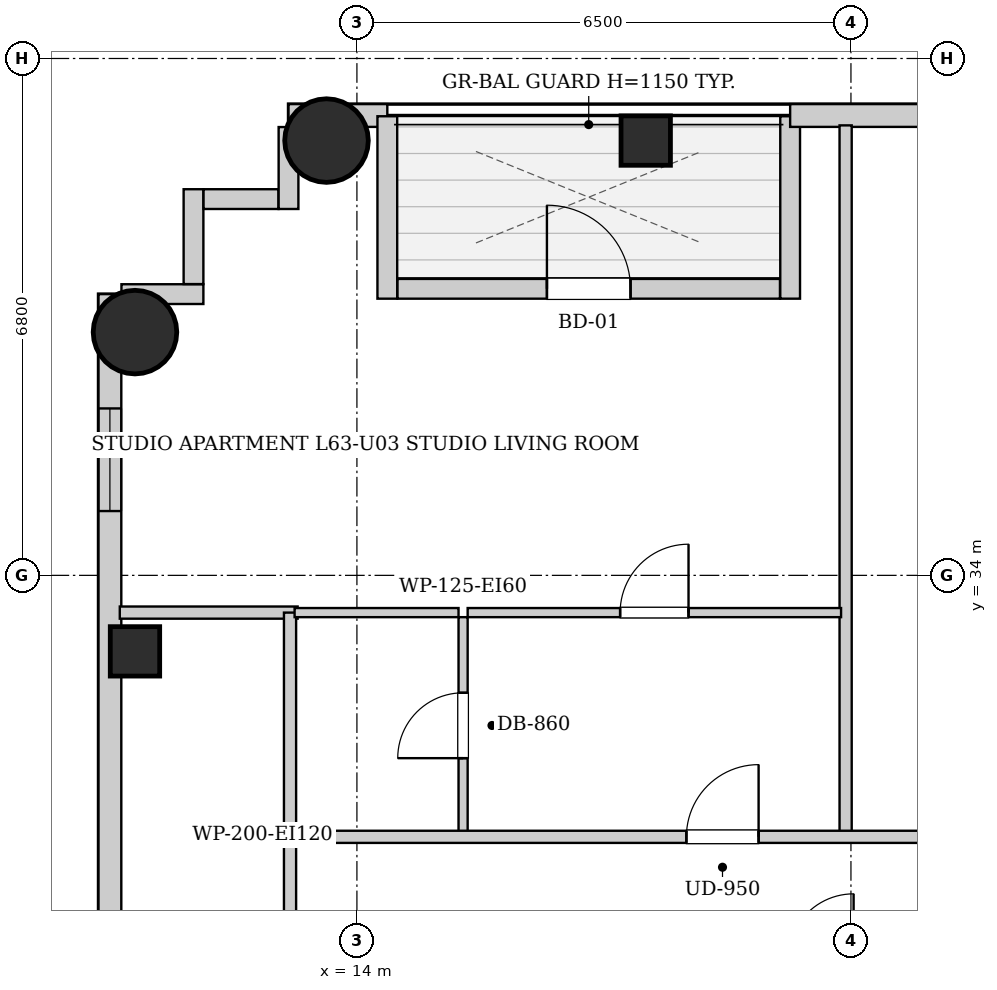
"""IFC4 building model, lengths in metres.
Left out: names, types, materials, properties, quantities, classifications, styles, units other than length and angle.
Written with IfcOpenShell. Run it as: python <this file> out.ifc"""

import sys

from ifc_helpers import new_model, si_unit, direction, frame, frame_2d, origin, origin_2d, place, context, subcontext, project, spatial, rectangle, circle, extrude, element, fill, save


model = new_model("IFC4")
c1 = context("Model", 3, precision=1e-05, world=origin(), true_north=direction((0.0, 1.0)))
c2 = subcontext(c1, "Body", "Model", "MODEL_VIEW")
j1 = project(units=[si_unit("LENGTHUNIT", "METRE"), si_unit("PLANEANGLEUNIT", "RADIAN")], contexts=[c1])
p1 = place(None, origin())
s1 = spatial("IfcSite", under=j1, at=p1, CompositionType="ELEMENT")
p2 = place(p1, origin())
s2 = spatial("IfcBuilding", under=s1, at=p2, CompositionType="ELEMENT")
p3 = place(p2, frame((0.0, 0.0, 217.3)))
s3 = spatial("IfcBuildingStorey", under=s2, at=p3, CompositionType="ELEMENT", Elevation=217.3)
p4 = place(p3, frame((13.6, 39.72, 0.0), z_axis=(0.0, 0.0, 1.0), x_axis=(1.0, 0.0, 0.0)))
e1 = element("IfcColumn", 1, at=p4, inside=s3, PredefinedType="COLUMN", context=c2, shape_type="SweptSolid", body=[
    extrude(circle(Radius=0.55, at=origin_2d()), origin(), (0.0, 0.0, 1.0), 3.4),
])
for number, where, z_axis, x_axis in (
    (2, (17.8, 39.72, 0.0), (0.0, 0.0, 1.0), (1.0, 0.0, 0.0)),
    (3, (11.08, 33.0, 0.0), (0.0, 0.0, 1.0), (1.0, 0.0, 0.0)),
):
    element("IfcColumn", number, at=place(p3, frame(where, z_axis=z_axis, x_axis=x_axis)), inside=s3, PredefinedType="COLUMN", context=c2, shape_type="SweptSolid", body=[
        extrude(rectangle(XDim=0.65, YDim=0.65, at=origin_2d()), origin(), (0.0, 0.0, 1.0), 3.4),
    ])
p5 = place(p3, frame((11.08, 37.2, 0.0), z_axis=(0.0, 0.0, 1.0), x_axis=(1.0, 0.0, 0.0)))
e4 = element("IfcColumn", 4, at=p5, inside=s3, PredefinedType="COLUMN", context=c2, shape_type="SweptSolid", body=[
    extrude(circle(Radius=0.55, at=origin_2d()), origin(), (0.0, 0.0, 1.0), 3.4),
])
p6 = place(p3, frame((13.1, 40.05, 0.0), z_axis=(0.0, 0.0, 1.0), x_axis=(1.0, 0.0, 0.0)))
e5 = element("IfcWall", 5, at=p6, inside=s3, PredefinedType="SOLIDWALL", context=c2, shape_type="SweptSolid", body=[
    extrude(rectangle(XDim=1.3, YDim=0.3, at=frame_2d((0.65, 0.0))), origin(), (0.0, 0.0, 1.0), 3.14),
])
p7 = place(p3, frame((14.4, 40.04, 0.0), z_axis=(0.0, 0.0, 1.0), x_axis=(0.0, -1.0, 0.0)))
e6 = element("IfcWall", 6, at=p7, inside=s3, PredefinedType="SOLIDWALL", context=c2, shape_type="SweptSolid", body=[
    extrude(rectangle(XDim=2.4, YDim=0.26, at=frame_2d((1.2, 0.0))), origin(), (0.0, 0.0, 1.0), 3.14),
])
p8 = place(p3, frame((14.534, 37.77, 0.0), z_axis=(0.0, 0.0, 1.0), x_axis=(1.0, 0.0, 0.0)))
e7 = element("IfcWall", 7, at=p8, inside=s3, PredefinedType="SOLIDWALL", context=c2, shape_type="SweptSolid", body=[
    extrude(rectangle(XDim=5.032, YDim=0.26, at=frame_2d((2.516, 0.0))), origin(), (0.0, 0.0, 1.0), 3.14),
])
p9 = place(p8, frame((1.966, 0.0, 0.0)))
e8 = element("IfcOpeningElement", 8, at=p9, cuts=e7, PredefinedType="OPENING", context=c2, shape_type="SweptSolid", body=[
    extrude(rectangle(XDim=1.1, YDim=2.0, at=frame_2d((0.55, 1.0))), frame((0.0, 0.14, 0.0), z_axis=(0.0, -1.0, 0.0), x_axis=(1.0, 0.0, 0.0)), (0.0, 0.0, 1.0), 0.28),
])
p10 = place(p3, frame((19.7, 37.64, 0.0), z_axis=(0.0, 0.0, 1.0), x_axis=(0.0, 1.0, 0.0)))
e9 = element("IfcWall", 9, at=p10, inside=s3, PredefinedType="SOLIDWALL", context=c2, shape_type="SweptSolid", body=[
    extrude(rectangle(XDim=2.4, YDim=0.26, at=frame_2d((1.2, 0.0))), origin(), (0.0, 0.0, 1.0), 3.14),
])
p11 = place(p3, frame((19.7, 40.05, 0.0), z_axis=(0.0, 0.0, 1.0), x_axis=(1.0, 0.0, 0.0)))
e10 = element("IfcWall", 10, at=p11, inside=s3, PredefinedType="SOLIDWALL", context=c2, shape_type="SweptSolid", body=[
    extrude(rectangle(XDim=9.15, YDim=0.3, at=frame_2d((4.575, 0.0))), origin(), (0.0, 0.0, 1.0), 3.14),
])
p12 = place(p11, frame((7.8, 0.0, 0.55)))
e11 = element("IfcOpeningElement", 11, at=p12, cuts=e10, PredefinedType="OPENING", context=c2, shape_type="SweptSolid", body=[
    extrude(rectangle(XDim=0.85, YDim=1.2, at=frame_2d((0.425, 0.6))), frame((0.0, 0.16, 0.0), z_axis=(0.0, -1.0, 0.0), x_axis=(1.0, 0.0, 0.0)), (0.0, 0.0, 1.0), 0.32),
])
p13 = place(p3, frame((10.75, 6.3, 0.0), z_axis=(0.0, 0.0, 1.0), x_axis=(0.0, 1.0, 0.0)))
e12 = element("IfcWall", 12, at=p13, inside=s3, PredefinedType="SOLIDWALL", context=c2, shape_type="SweptSolid", body=[
    extrude(rectangle(XDim=31.4, YDim=0.3, at=frame_2d((15.7, 0.0))), origin(), (0.0, 0.0, 1.0), 3.14),
])
p14 = place(p13, frame((1.504, 0.0, 0.55)))
e13 = element("IfcOpeningElement", 13, at=p14, cuts=e12, PredefinedType="OPENING", context=c2, shape_type="SweptSolid", body=[
    extrude(rectangle(XDim=1.35, YDim=1.2, at=frame_2d((0.675, 0.6))), frame((0.0, 0.16, 0.0), z_axis=(0.0, -1.0, 0.0), x_axis=(1.0, 0.0, 0.0)), (0.0, 0.0, 1.0), 0.32),
])
p15 = place(p13, frame((28.546, 0.0, 0.55)))
e14 = element("IfcOpeningElement", 14, at=p15, cuts=e12, PredefinedType="OPENING", context=c2, shape_type="SweptSolid", body=[
    extrude(rectangle(XDim=1.35, YDim=1.2, at=frame_2d((0.675, 0.6))), frame((0.0, 0.16, 0.0), z_axis=(0.0, -1.0, 0.0), x_axis=(1.0, 0.0, 0.0)), (0.0, 0.0, 1.0), 0.32),
])
p16 = place(p13, frame((10.367, 0.0, 0.55)))
e15 = element("IfcOpeningElement", 15, at=p16, cuts=e12, PredefinedType="OPENING", context=c2, shape_type="SweptSolid", body=[
    extrude(rectangle(XDim=1.35, YDim=1.2, at=frame_2d((0.675, 0.6))), frame((0.0, 0.16, 0.0), z_axis=(0.0, -1.0, 0.0), x_axis=(1.0, 0.0, 0.0)), (0.0, 0.0, 1.0), 0.32),
])
p17 = place(p13, frame((19.683, 0.0, 0.55)))
e16 = element("IfcOpeningElement", 16, at=p17, cuts=e12, PredefinedType="OPENING", context=c2, shape_type="SweptSolid", body=[
    extrude(rectangle(XDim=1.35, YDim=1.2, at=frame_2d((0.675, 0.6))), frame((0.0, 0.16, 0.0), z_axis=(0.0, -1.0, 0.0), x_axis=(1.0, 0.0, 0.0)), (0.0, 0.0, 1.0), 0.32),
])
p18 = place(p3, frame((10.902, 37.7, 0.0), z_axis=(0.0, 0.0, 1.0), x_axis=(1.0, 0.0, 0.0)))
e17 = element("IfcWall", 17, at=p18, inside=s3, PredefinedType="SOLIDWALL", context=c2, shape_type="SweptSolid", body=[
    extrude(rectangle(XDim=1.078, YDim=0.26, at=frame_2d((0.539, 0.0))), origin(), (0.0, 0.0, 1.0), 3.14),
])
p19 = place(p3, frame((11.85, 37.832, 0.0), z_axis=(0.0, 0.0, 1.0), x_axis=(0.0, 1.0, 0.0)))
e18 = element("IfcWall", 18, at=p19, inside=s3, PredefinedType="SOLIDWALL", context=c2, shape_type="SweptSolid", body=[
    extrude(rectangle(XDim=1.248, YDim=0.26, at=frame_2d((0.624, 0.0))), origin(), (0.0, 0.0, 1.0), 3.14),
])
p20 = place(p3, frame((11.982, 38.95, 0.0), z_axis=(0.0, 0.0, 1.0), x_axis=(1.0, 0.0, 0.0)))
e19 = element("IfcWall", 19, at=p20, inside=s3, PredefinedType="SOLIDWALL", context=c2, shape_type="SweptSolid", body=[
    extrude(rectangle(XDim=0.986, YDim=0.26, at=frame_2d((0.493, 0.0))), origin(), (0.0, 0.0, 1.0), 3.14),
])
p21 = place(p3, frame((13.1, 38.82, 0.0), z_axis=(0.0, 0.0, 1.0), x_axis=(0.0, 1.0, 0.0)))
e20 = element("IfcWall", 20, at=p21, inside=s3, PredefinedType="SOLIDWALL", context=c2, shape_type="SweptSolid", body=[
    extrude(rectangle(XDim=1.078, YDim=0.26, at=frame_2d((0.539, 0.0))), origin(), (0.0, 0.0, 1.0), 3.14),
])
p22 = place(p3, frame((13.12, 28.98, 0.0), z_axis=(0.0, 0.0, 1.0), x_axis=(0.0, 1.0, 0.0)))
e21 = element("IfcWall", 21, at=p22, inside=s3, PredefinedType="PARTITIONING", context=c2, shape_type="SweptSolid", body=[
    extrude(rectangle(XDim=1.58, YDim=0.16, at=frame_2d((0.79, 0.0))), origin(), (0.0, 0.0, 1.0), 3.14),
])
p23 = place(p3, frame((10.88, 33.51, 0.0), z_axis=(0.0, 0.0, 1.0), x_axis=(1.0, 0.0, 0.0)))
e22 = element("IfcWall", 22, at=p23, inside=s3, PredefinedType="PARTITIONING", context=c2, shape_type="SweptSolid", body=[
    extrude(rectangle(XDim=2.34, YDim=0.16, at=frame_2d((1.17, 0.0))), origin(), (0.0, 0.0, 1.0), 3.14),
])
p24 = place(p3, frame((13.12, 30.6, 0.0), z_axis=(0.0, 0.0, 1.0), x_axis=(0.0, 1.0, 0.0)))
e23 = element("IfcWall", 23, at=p24, inside=s3, PredefinedType="PARTITIONING", context=c2, shape_type="SweptSolid", body=[
    extrude(rectangle(XDim=2.91, YDim=0.16, at=frame_2d((1.455, 0.0))), origin(), (0.0, 0.0, 1.0), 3.14),
])
p25 = place(p3, frame((20.43, 30.6, 0.0), z_axis=(0.0, 0.0, 1.0), x_axis=(0.0, 1.0, 0.0)))
e24 = element("IfcWall", 24, at=p25, inside=s3, PredefinedType="PARTITIONING", context=c2, shape_type="SweptSolid", body=[
    extrude(rectangle(XDim=9.32, YDim=0.16, at=frame_2d((4.66, 0.0))), origin(), (0.0, 0.0, 1.0), 3.14),
])
p26 = place(p3, frame((15.397, 30.6, 0.0), z_axis=(0.0, 0.0, 1.0), x_axis=(0.0, 1.0, 0.0)))
e25 = element("IfcWall", 25, at=p26, inside=s3, PredefinedType="PARTITIONING", context=c2, shape_type="SweptSolid", body=[
    extrude(rectangle(XDim=2.85, YDim=0.12, at=frame_2d((1.425, 0.0))), origin(), (0.0, 0.0, 1.0), 3.14),
])
p27 = place(p26, frame((0.995, 0.0, 0.0)))
e26 = element("IfcOpeningElement", 26, at=p27, cuts=e25, PredefinedType="OPENING", context=c2, shape_type="SweptSolid", body=[
    extrude(rectangle(XDim=0.86, YDim=2.05, at=frame_2d((0.43, 1.025))), frame((0.0, 0.07, 0.0), z_axis=(0.0, -1.0, 0.0), x_axis=(1.0, 0.0, 0.0)), (0.0, 0.0, 1.0), 0.14),
])
p28 = place(p3, frame((13.18, 33.51, 0.0), z_axis=(0.0, 0.0, 1.0), x_axis=(1.0, 0.0, 0.0)))
e27 = element("IfcWall", 27, at=p28, inside=s3, PredefinedType="PARTITIONING", context=c2, shape_type="SweptSolid", body=[
    extrude(rectangle(XDim=2.157, YDim=0.12, at=frame_2d((1.079, 0.0))), origin(), (0.0, 0.0, 1.0), 3.14),
])
p29 = place(p3, frame((15.457, 33.51, 0.0), z_axis=(0.0, 0.0, 1.0), x_axis=(1.0, 0.0, 0.0)))
e28 = element("IfcWall", 28, at=p29, inside=s3, PredefinedType="PARTITIONING", context=c2, shape_type="SweptSolid", body=[
    extrude(rectangle(XDim=4.913, YDim=0.12, at=frame_2d((2.457, 0.0))), origin(), (0.0, 0.0, 1.0), 3.14),
])
p30 = place(p29, frame((2.006, 0.0, 0.0)))
e29 = element("IfcOpeningElement", 29, at=p30, cuts=e28, PredefinedType="OPENING", context=c2, shape_type="SweptSolid", body=[
    extrude(rectangle(XDim=0.9, YDim=2.05, at=frame_2d((0.45, 1.025))), frame((0.0, 0.07, 0.0), z_axis=(0.0, -1.0, 0.0), x_axis=(1.0, 0.0, 0.0)), (0.0, 0.0, 1.0), 0.14),
])
p31 = place(p3, frame((13.15, 30.56, 0.0), z_axis=(0.0, 0.0, 1.0), x_axis=(1.0, 0.0, 0.0)))
e30 = element("IfcWall", 30, at=p31, inside=s3, PredefinedType="PARTITIONING", context=c2, shape_type="SweptSolid", body=[
    extrude(rectangle(XDim=24.6, YDim=0.16, at=frame_2d((12.3, 0.0))), origin(), (0.0, 0.0, 1.0), 3.14),
])
p32 = place(p31, frame((5.185, 0.0, 0.0)))
e31 = element("IfcOpeningElement", 31, at=p32, cuts=e30, PredefinedType="OPENING", context=c2, shape_type="SweptSolid", body=[
    extrude(rectangle(XDim=0.95, YDim=2.1, at=frame_2d((0.475, 1.05))), frame((0.0, 0.09, 0.0), z_axis=(0.0, -1.0, 0.0), x_axis=(1.0, 0.0, 0.0)), (0.0, 0.0, 1.0), 0.18),
])
p33 = place(p31, frame((14.16, 0.0, 0.0)))
e32 = element("IfcOpeningElement", 32, at=p33, cuts=e30, PredefinedType="OPENING", context=c2, shape_type="SweptSolid", body=[
    extrude(rectangle(XDim=0.95, YDim=2.1, at=frame_2d((0.475, 1.05))), frame((0.0, 0.09, 0.0), z_axis=(0.0, -1.0, 0.0), x_axis=(1.0, 0.0, 0.0)), (0.0, 0.0, 1.0), 0.18),
])
p34 = place(p31, frame((22.825, 0.0, 0.0)))
e33 = element("IfcOpeningElement", 33, at=p34, cuts=e30, PredefinedType="OPENING", context=c2, shape_type="SweptSolid", body=[
    extrude(rectangle(XDim=0.95, YDim=2.1, at=frame_2d((0.475, 1.05))), frame((0.0, 0.09, 0.0), z_axis=(0.0, -1.0, 0.0), x_axis=(1.0, 0.0, 0.0)), (0.0, 0.0, 1.0), 0.18),
])
p35 = place(p27, origin())
e34 = element("IfcDoor", 34, at=p35, inside=s3, OperationType="SINGLE_SWING_LEFT", PredefinedType="DOOR", context=c2, shape_type="SweptSolid", body=[
    extrude(rectangle(XDim=0.86, YDim=2.05, at=frame_2d((0.43, 1.025))), frame((0.0, 0.025, 0.0), z_axis=(0.0, -1.0, 0.0), x_axis=(1.0, 0.0, 0.0)), (0.0, 0.0, 1.0), 0.05),
])
fill(e26, e34)
p36 = place(p30, origin())
e35 = element("IfcDoor", 35, at=p36, inside=s3, OperationType="SINGLE_SWING_RIGHT", PredefinedType="DOOR", context=c2, shape_type="SweptSolid", body=[
    extrude(rectangle(XDim=0.9, YDim=2.05, at=frame_2d((0.45, 1.025))), frame((0.0, 0.025, 0.0), z_axis=(0.0, -1.0, 0.0), x_axis=(1.0, 0.0, 0.0)), (0.0, 0.0, 1.0), 0.05),
])
fill(e29, e35)
p37 = place(p32, origin())
e36 = element("IfcDoor", 36, at=p37, inside=s3, OperationType="SINGLE_SWING_RIGHT", PredefinedType="DOOR", context=c2, shape_type="SweptSolid", body=[
    extrude(rectangle(XDim=0.95, YDim=2.1, at=frame_2d((0.475, 1.05))), frame((0.0, 0.025, 0.0), z_axis=(0.0, -1.0, 0.0), x_axis=(1.0, 0.0, 0.0)), (0.0, 0.0, 1.0), 0.05),
])
fill(e31, e36)
p38 = place(p9, origin())
e37 = element("IfcDoor", 37, at=p38, inside=s3, OperationType="SINGLE_SWING_LEFT", PredefinedType="DOOR", context=c2, shape_type="SweptSolid", body=[
    extrude(rectangle(XDim=1.1, YDim=2.0, at=frame_2d((0.55, 1.0))), frame((0.0, 0.025, 0.0), z_axis=(0.0, -1.0, 0.0), x_axis=(1.0, 0.0, 0.0)), (0.0, 0.0, 1.0), 0.05),
])
fill(e8, e37)
p39 = place(p15, origin())
e38 = element("IfcWindow", 38, at=p39, inside=s3, PartitioningType="SINGLE_PANEL", PredefinedType="WINDOW", context=c2, shape_type="SweptSolid", body=[
    extrude(rectangle(XDim=1.35, YDim=1.2, at=frame_2d((0.675, 0.6))), frame((0.0, 0.03, 0.0), z_axis=(0.0, -1.0, 0.0), x_axis=(1.0, 0.0, 0.0)), (0.0, 0.0, 1.0), 0.06),
])
fill(e14, e38)
save(model, sys.argv[1])
